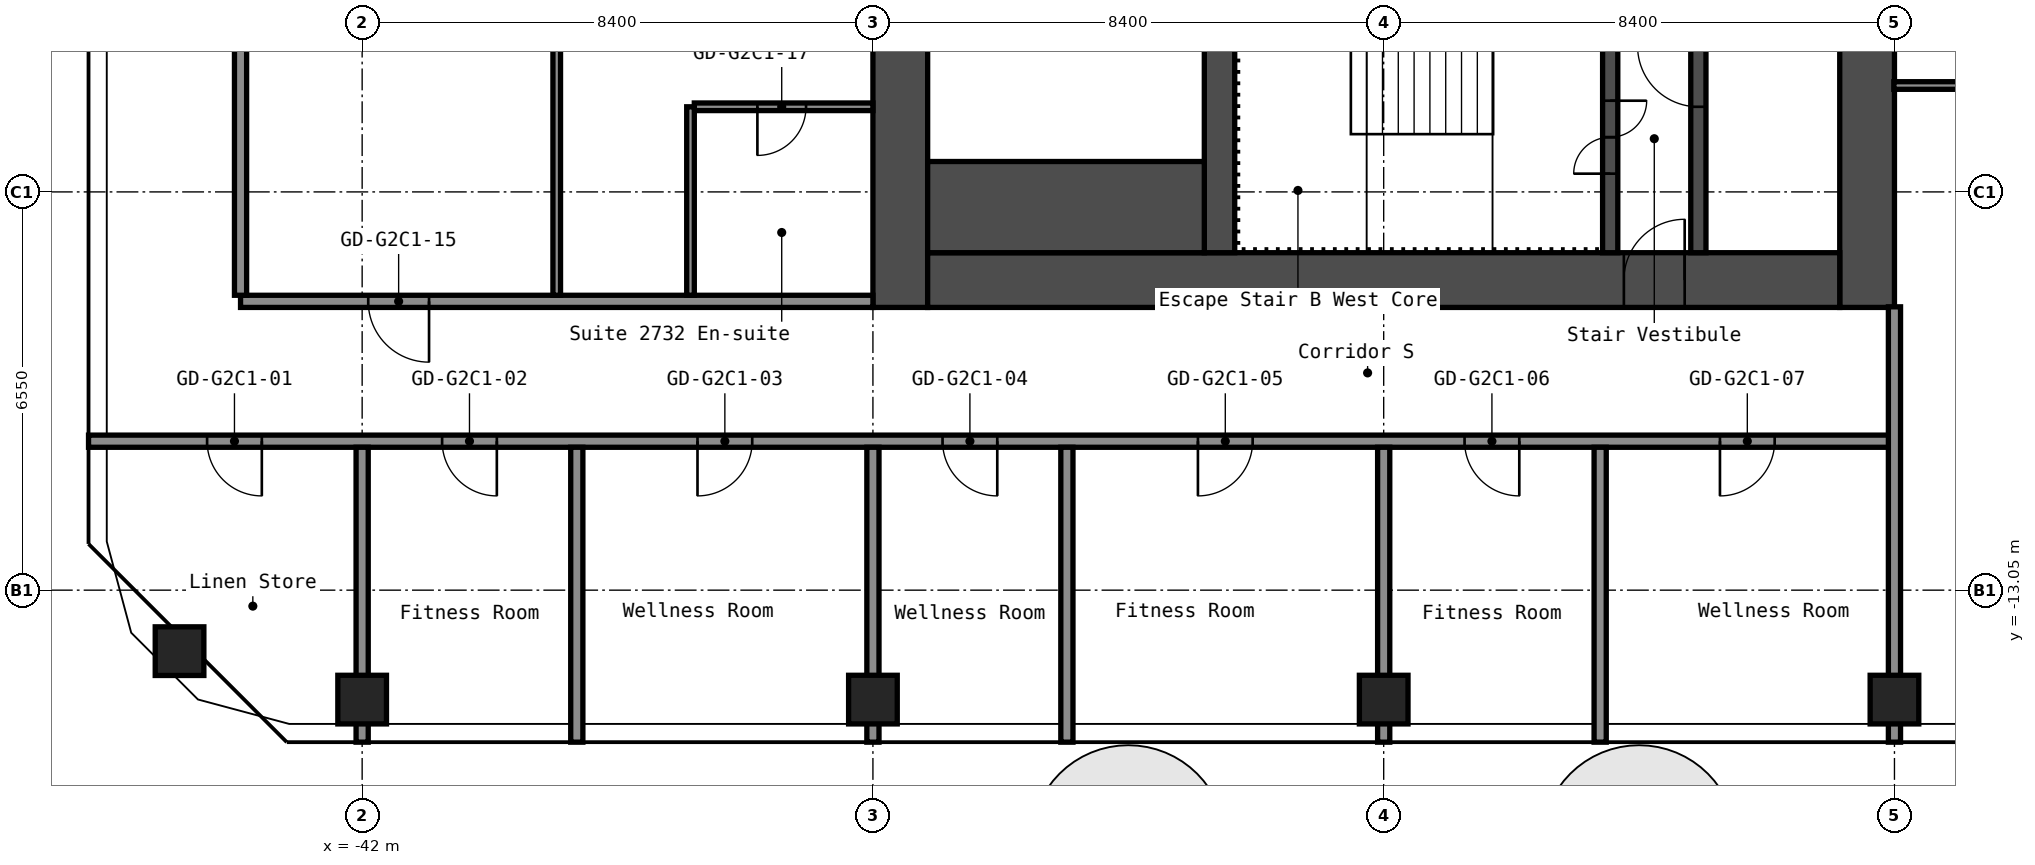
"""IFC4 building model, lengths in metres.
Left out: names, types, materials, properties, quantities, classifications, styles, units other than length and angle.
Written with IfcOpenShell. Run it as: python <this file> out.ifc"""

import sys

from ifc_helpers import new_model, si_unit, direction, frame, frame_2d, origin, origin_2d, place, context, subcontext, project, spatial, rectangle, hollow_rectangle, extrude, element, fill, save


model = new_model("IFC4")
c1 = context("Model", 3, precision=1e-05, world=origin(), true_north=direction((0.0, 1.0)))
c2 = subcontext(c1, "Body", "Model", "MODEL_VIEW")
j1 = project(units=[si_unit("LENGTHUNIT", "METRE"), si_unit("PLANEANGLEUNIT", "RADIAN")], contexts=[c1])
p1 = place(None, origin())
s1 = spatial("IfcSite", under=j1, at=p1, CompositionType="ELEMENT")
p2 = place(p1, origin())
s2 = spatial("IfcBuilding", under=s1, at=p2, CompositionType="ELEMENT")
p3 = place(p2, frame((0.0, 0.0, 97.8)))
s3 = spatial("IfcBuildingStorey", under=s2, at=p3, CompositionType="ELEMENT", Elevation=97.8)
for number, where, z_axis, x_axis in (
    (1, (-45.003, -14.053, 0.0), (0.0, 0.0, 1.0), (1.0, 0.0, 0.0)),
    (2, (-42.0, -14.85, 0.0), (0.0, 0.0, 1.0), (1.0, 0.0, 0.0)),
    (3, (-33.6, -14.85, 0.0), (0.0, 0.0, 1.0), (1.0, 0.0, 0.0)),
    (4, (-25.2, -14.85, 0.0), (0.0, 0.0, 1.0), (1.0, 0.0, 0.0)),
    (5, (-16.8, -14.85, 0.0), (0.0, 0.0, 1.0), (1.0, 0.0, 0.0)),
):
    element("IfcColumn", number, at=place(p3, frame(where, z_axis=z_axis, x_axis=x_axis)), inside=s3, PredefinedType="COLUMN", context=c2, shape_type="SweptSolid", body=[
        extrude(hollow_rectangle(XDim=0.8, YDim=0.8, WallThickness=0.032, at=origin_2d()), origin(), (0.0, 0.0, 1.0), 2.8),
    ])
p4 = place(p3, frame((-17.25, -8.4, 0.0), z_axis=(0.0, 0.0, 1.0), x_axis=(0.0, 1.0, 0.0)))
e6 = element("IfcWall", 6, at=p4, inside=s3, PredefinedType="SHEAR", context=c2, shape_type="SweptSolid", body=[
    extrude(rectangle(XDim=16.8, YDim=0.9, at=frame_2d((8.4, 0.0))), origin(), (0.0, 0.0, 1.0), 2.8),
])
p5 = place(p4, frame((7.6, 0.0, 0.0)))
e7 = element("IfcOpeningElement", 7, at=p5, cuts=e6, PredefinedType="OPENING", context=c2, shape_type="SweptSolid", body=[
    extrude(rectangle(XDim=1.2, YDim=2.1, at=frame_2d((0.6, 1.05))), frame((0.0, 0.46, 0.0), z_axis=(0.0, -1.0, 0.0), x_axis=(1.0, 0.0, 0.0)), (0.0, 0.0, 1.0), 0.92),
])
p6 = place(p3, frame((-33.15, -8.4, 0.0), z_axis=(0.0, 0.0, 1.0), x_axis=(0.0, 1.0, 0.0)))
e8 = element("IfcWall", 8, at=p6, inside=s3, PredefinedType="SHEAR", context=c2, shape_type="SweptSolid", body=[
    extrude(rectangle(XDim=16.8, YDim=0.9, at=frame_2d((8.4, 0.0))), origin(), (0.0, 0.0, 1.0), 2.8),
])
p7 = place(p3, frame((-32.7, -7.95, 0.0), z_axis=(0.0, 0.0, 1.0), x_axis=(1.0, 0.0, 0.0)))
e9 = element("IfcWall", 9, at=p7, inside=s3, PredefinedType="SHEAR", context=c2, shape_type="SweptSolid", body=[
    extrude(rectangle(XDim=15.0, YDim=0.9, at=frame_2d((7.5, 0.0))), origin(), (0.0, 0.0, 1.0), 2.8),
])
p8 = place(p7, frame((11.45, 0.0, 0.0)))
e10 = element("IfcOpeningElement", 10, at=p8, cuts=e9, PredefinedType="OPENING", context=c2, shape_type="SweptSolid", body=[
    extrude(rectangle(XDim=1.0, YDim=2.1, at=frame_2d((0.5, 1.05))), frame((0.0, 0.46, 0.0), z_axis=(0.0, -1.0, 0.0), x_axis=(1.0, 0.0, 0.0)), (0.0, 0.0, 1.0), 0.92),
])
p9 = place(p3, frame((-20.025, -7.5, 0.0), z_axis=(0.0, 0.0, 1.0), x_axis=(0.0, 1.0, 0.0)))
e11 = element("IfcWall", 11, at=p9, inside=s3, PredefinedType="SHEAR", context=c2, shape_type="SweptSolid", body=[
    extrude(rectangle(XDim=6.3, YDim=0.25, at=frame_2d((3.15, 0.0))), origin(), (0.0, 0.0, 1.0), 2.8),
])
p10 = place(p9, frame((2.4, 0.0, 0.0)))
e12 = element("IfcOpeningElement", 12, at=p10, cuts=e11, PredefinedType="OPENING", context=c2, shape_type="SweptSolid", body=[
    extrude(rectangle(XDim=1.0, YDim=2.1, at=frame_2d((0.5, 1.05))), frame((0.0, 0.135, 0.0), z_axis=(0.0, -1.0, 0.0), x_axis=(1.0, 0.0, 0.0)), (0.0, 0.0, 1.0), 0.27),
])
p11 = place(p3, frame((-21.475, -7.5, 0.0), z_axis=(0.0, 0.0, 1.0), x_axis=(0.0, 1.0, 0.0)))
e13 = element("IfcWall", 13, at=p11, inside=s3, PredefinedType="SHEAR", context=c2, shape_type="SweptSolid", body=[
    extrude(rectangle(XDim=3.75, YDim=0.25, at=frame_2d((1.875, 0.0))), origin(), (0.0, 0.0, 1.0), 2.8),
])
p12 = place(p11, frame((1.3, 0.0, 0.0)))
e14 = element("IfcOpeningElement", 14, at=p12, cuts=e13, PredefinedType="OPENING", context=c2, shape_type="SweptSolid", body=[
    extrude(rectangle(XDim=1.2, YDim=2.1, at=frame_2d((0.6, 1.05))), frame((0.0, 0.135, 0.0), z_axis=(0.0, -1.0, 0.0), x_axis=(1.0, 0.0, 0.0)), (0.0, 0.0, 1.0), 0.27),
])
p13 = place(p3, frame((-27.9, -7.5, 0.0), z_axis=(0.0, 0.0, 1.0), x_axis=(0.0, 1.0, 0.0)))
e15 = element("IfcWall", 15, at=p13, inside=s3, PredefinedType="SHEAR", context=c2, shape_type="SweptSolid", body=[
    extrude(rectangle(XDim=3.75, YDim=0.5, at=frame_2d((1.875, 0.0))), origin(), (0.0, 0.0, 1.0), 2.8),
])
p14 = place(p3, frame((-32.7, -6.75, 0.0), z_axis=(0.0, 0.0, 1.0), x_axis=(1.0, 0.0, 0.0)))
e16 = element("IfcWall", 16, at=p14, inside=s3, PredefinedType="SHEAR", context=c2, shape_type="SweptSolid", body=[
    extrude(rectangle(XDim=4.55, YDim=1.5, at=frame_2d((2.275, 0.0))), origin(), (0.0, 0.0, 1.0), 2.8),
])
p15 = place(p3, frame((-46.5, -10.6, 0.0), z_axis=(0.0, 0.0, 1.0), x_axis=(1.0, 0.0, 0.0)))
e17 = element("IfcWall", 17, at=p15, inside=s3, PredefinedType="PARTITIONING", context=c2, shape_type="SweptSolid", body=[
    extrude(rectangle(XDim=29.7, YDim=0.2, at=frame_2d((14.85, 0.0))), origin(), (0.0, 0.0, 1.0), 2.8),
])
p16 = place(p15, frame((1.95, 0.0, 0.0)))
e18 = element("IfcOpeningElement", 18, at=p16, cuts=e17, PredefinedType="OPENING", context=c2, shape_type="SweptSolid", body=[
    extrude(rectangle(XDim=0.9, YDim=2.1, at=frame_2d((0.45, 1.05))), frame((0.0, 0.11, 0.0), z_axis=(0.0, -1.0, 0.0), x_axis=(1.0, 0.0, 0.0)), (0.0, 0.0, 1.0), 0.22),
])
p17 = place(p15, frame((5.815, 0.0, 0.0)))
e19 = element("IfcOpeningElement", 19, at=p17, cuts=e17, PredefinedType="OPENING", context=c2, shape_type="SweptSolid", body=[
    extrude(rectangle(XDim=0.9, YDim=2.1, at=frame_2d((0.45, 1.05))), frame((0.0, 0.11, 0.0), z_axis=(0.0, -1.0, 0.0), x_axis=(1.0, 0.0, 0.0)), (0.0, 0.0, 1.0), 0.22),
])
p18 = place(p15, frame((10.015, 0.0, 0.0)))
e20 = element("IfcOpeningElement", 20, at=p18, cuts=e17, PredefinedType="OPENING", context=c2, shape_type="SweptSolid", body=[
    extrude(rectangle(XDim=0.9, YDim=2.1, at=frame_2d((0.45, 1.05))), frame((0.0, 0.11, 0.0), z_axis=(0.0, -1.0, 0.0), x_axis=(1.0, 0.0, 0.0)), (0.0, 0.0, 1.0), 0.22),
])
p19 = place(p15, frame((14.045, 0.0, 0.0)))
e21 = element("IfcOpeningElement", 21, at=p19, cuts=e17, PredefinedType="OPENING", context=c2, shape_type="SweptSolid", body=[
    extrude(rectangle(XDim=0.9, YDim=2.1, at=frame_2d((0.45, 1.05))), frame((0.0, 0.11, 0.0), z_axis=(0.0, -1.0, 0.0), x_axis=(1.0, 0.0, 0.0)), (0.0, 0.0, 1.0), 0.22),
])
p20 = place(p15, frame((18.245, 0.0, 0.0)))
e22 = element("IfcOpeningElement", 22, at=p20, cuts=e17, PredefinedType="OPENING", context=c2, shape_type="SweptSolid", body=[
    extrude(rectangle(XDim=0.9, YDim=2.1, at=frame_2d((0.45, 1.05))), frame((0.0, 0.11, 0.0), z_axis=(0.0, -1.0, 0.0), x_axis=(1.0, 0.0, 0.0)), (0.0, 0.0, 1.0), 0.22),
])
p21 = place(p15, frame((22.63, 0.0, 0.0)))
e23 = element("IfcOpeningElement", 23, at=p21, cuts=e17, PredefinedType="OPENING", context=c2, shape_type="SweptSolid", body=[
    extrude(rectangle(XDim=0.9, YDim=2.1, at=frame_2d((0.45, 1.05))), frame((0.0, 0.11, 0.0), z_axis=(0.0, -1.0, 0.0), x_axis=(1.0, 0.0, 0.0)), (0.0, 0.0, 1.0), 0.22),
])
p22 = place(p15, frame((26.83, 0.0, 0.0)))
e24 = element("IfcOpeningElement", 24, at=p22, cuts=e17, PredefinedType="OPENING", context=c2, shape_type="SweptSolid", body=[
    extrude(rectangle(XDim=0.9, YDim=2.1, at=frame_2d((0.45, 1.05))), frame((0.0, 0.11, 0.0), z_axis=(0.0, -1.0, 0.0), x_axis=(1.0, 0.0, 0.0)), (0.0, 0.0, 1.0), 0.22),
])
p23 = place(p3, frame((-44.0, -8.3, 0.0), z_axis=(0.0, 0.0, 1.0), x_axis=(1.0, 0.0, 0.0)))
e25 = element("IfcWall", 25, at=p23, inside=s3, PredefinedType="PARTITIONING", context=c2, shape_type="SweptSolid", body=[
    extrude(rectangle(XDim=10.4, YDim=0.2, at=frame_2d((5.2, 0.0))), origin(), (0.0, 0.0, 1.0), 2.8),
])
p24 = place(p23, frame((2.1, 0.0, 0.0)))
e26 = element("IfcOpeningElement", 26, at=p24, cuts=e25, PredefinedType="OPENING", context=c2, shape_type="SweptSolid", body=[
    extrude(rectangle(XDim=1.0, YDim=2.1, at=frame_2d((0.5, 1.05))), frame((0.0, 0.11, 0.0), z_axis=(0.0, -1.0, 0.0), x_axis=(1.0, 0.0, 0.0)), (0.0, 0.0, 1.0), 0.22),
])
p25 = place(p3, frame((-36.538, -5.1, 0.0), z_axis=(0.0, 0.0, 1.0), x_axis=(1.0, 0.0, 0.0)))
e27 = element("IfcWall", 27, at=p25, inside=s3, PredefinedType="PARTITIONING", context=c2, shape_type="SweptSolid", body=[
    extrude(rectangle(XDim=2.938, YDim=0.125, at=frame_2d((1.469, 0.0))), origin(), (0.0, 0.0, 1.0), 2.8),
])
p26 = place(p25, frame((1.038, 0.0, 0.0)))
e28 = element("IfcOpeningElement", 28, at=p26, cuts=e27, PredefinedType="OPENING", context=c2, shape_type="SweptSolid", body=[
    extrude(rectangle(XDim=0.8, YDim=2.1, at=frame_2d((0.4, 1.05))), frame((0.0, 0.073, 0.0), z_axis=(0.0, -1.0, 0.0), x_axis=(1.0, 0.0, 0.0)), (0.0, 0.0, 1.0), 0.145),
])
p27 = place(p3, frame((-16.81, -4.75, 0.0), z_axis=(0.0, 0.0, 1.0), x_axis=(1.0, 0.0, 0.0)))
e29 = element("IfcWall", 29, at=p27, inside=s3, PredefinedType="PARTITIONING", context=c2, shape_type="SweptSolid", body=[
    extrude(rectangle(XDim=3.348, YDim=0.125, at=frame_2d((1.674, 0.0))), origin(), (0.0, 0.0, 1.0), 2.8),
])
p28 = place(p27, frame((1.31, 0.0, 0.0)))
e30 = element("IfcOpeningElement", 30, at=p28, cuts=e29, PredefinedType="OPENING", context=c2, shape_type="SweptSolid", body=[
    extrude(rectangle(XDim=0.8, YDim=2.1, at=frame_2d((0.4, 1.05))), frame((0.0, 0.073, 0.0), z_axis=(0.0, -1.0, 0.0), x_axis=(1.0, 0.0, 0.0)), (0.0, 0.0, 1.0), 0.145),
])
p29 = place(p3, frame((-44.0, -8.2, 0.0), z_axis=(0.0, 0.0, 1.0), x_axis=(0.0, 1.0, 0.0)))
e31 = element("IfcWall", 31, at=p29, inside=s3, PredefinedType="PARTITIONING", context=c2, shape_type="SweptSolid", body=[
    extrude(rectangle(XDim=16.4, YDim=0.2, at=frame_2d((8.2, 0.0))), origin(), (0.0, 0.0, 1.0), 2.8),
])
p30 = place(p3, frame((-42.0, -15.55, 0.0), z_axis=(0.0, 0.0, 1.0), x_axis=(0.0, 1.0, 0.0)))
e32 = element("IfcWall", 32, at=p30, inside=s3, PredefinedType="PARTITIONING", context=c2, shape_type="SweptSolid", body=[
    extrude(rectangle(XDim=4.85, YDim=0.2, at=frame_2d((2.425, 0.0))), origin(), (0.0, 0.0, 1.0), 2.8),
])
p31 = place(p3, frame((-38.8, -8.2, 0.0), z_axis=(0.0, 0.0, 1.0), x_axis=(0.0, 1.0, 0.0)))
e33 = element("IfcWall", 33, at=p31, inside=s3, PredefinedType="PARTITIONING", context=c2, shape_type="SweptSolid", body=[
    extrude(rectangle(XDim=8.1, YDim=0.125, at=frame_2d((4.05, 0.0))), origin(), (0.0, 0.0, 1.0), 2.8),
])
p32 = place(p31, frame((4.05, 0.0, 0.0)))
e34 = element("IfcOpeningElement", 34, at=p32, cuts=e33, PredefinedType="OPENING", context=c2, shape_type="SweptSolid", body=[
    extrude(rectangle(XDim=0.9, YDim=2.1, at=frame_2d((0.45, 1.05))), frame((0.0, 0.073, 0.0), z_axis=(0.0, -1.0, 0.0), x_axis=(1.0, 0.0, 0.0)), (0.0, 0.0, 1.0), 0.145),
])
p33 = place(p3, frame((-38.47, -15.55, 0.0), z_axis=(0.0, 0.0, 1.0), x_axis=(0.0, 1.0, 0.0)))
e35 = element("IfcWall", 35, at=p33, inside=s3, PredefinedType="PARTITIONING", context=c2, shape_type="SweptSolid", body=[
    extrude(rectangle(XDim=4.85, YDim=0.2, at=frame_2d((2.425, 0.0))), origin(), (0.0, 0.0, 1.0), 2.8),
])
p34 = place(p3, frame((-36.6, -8.2, 0.0), z_axis=(0.0, 0.0, 1.0), x_axis=(0.0, 1.0, 0.0)))
e36 = element("IfcWall", 36, at=p34, inside=s3, PredefinedType="PARTITIONING", context=c2, shape_type="SweptSolid", body=[
    extrude(rectangle(XDim=3.1, YDim=0.125, at=frame_2d((1.55, 0.0))), origin(), (0.0, 0.0, 1.0), 2.8),
])
for number, where, z_axis, x_axis in (
    (37, (-33.6, -15.55, 0.0), (0.0, 0.0, 1.0), (0.0, 1.0, 0.0)),
    (38, (-30.41, -15.55, 0.0), (0.0, 0.0, 1.0), (0.0, 1.0, 0.0)),
    (39, (-25.2, -15.55, 0.0), (0.0, 0.0, 1.0), (0.0, 1.0, 0.0)),
    (40, (-21.64, -15.55, 0.0), (0.0, 0.0, 1.0), (0.0, 1.0, 0.0)),
):
    element("IfcWall", number, at=place(p3, frame(where, z_axis=z_axis, x_axis=x_axis)), inside=s3, PredefinedType="PARTITIONING", context=c2, shape_type="SweptSolid", body=[
        extrude(rectangle(XDim=4.85, YDim=0.2, at=frame_2d((2.425, 0.0))), origin(), (0.0, 0.0, 1.0), 2.8),
    ])
p35 = place(p3, frame((-16.8, -15.55, 0.0), z_axis=(0.0, 0.0, 1.0), x_axis=(0.0, 1.0, 0.0)))
e41 = element("IfcWall", 41, at=p35, inside=s3, PredefinedType="PARTITIONING", context=c2, shape_type="SweptSolid", body=[
    extrude(rectangle(XDim=7.16, YDim=0.2, at=frame_2d((3.58, 0.0))), origin(), (0.0, 0.0, 1.0), 2.8),
])
p36 = place(p8, origin())
e42 = element("IfcDoor", 42, at=p36, inside=s3, OperationType="SINGLE_SWING_LEFT", PredefinedType="DOOR", context=c2, shape_type="SweptSolid", body=[
    extrude(rectangle(XDim=1.0, YDim=2.1, at=frame_2d((0.5, 1.05))), frame((0.0, 0.025, 0.0), z_axis=(0.0, -1.0, 0.0), x_axis=(1.0, 0.0, 0.0)), (0.0, 0.0, 1.0), 0.05),
])
fill(e10, e42)
p37 = place(p12, origin())
e43 = element("IfcDoor", 43, at=p37, inside=s3, OperationType="DOUBLE_DOOR_SINGLE_SWING", PredefinedType="DOOR", context=c2, shape_type="SweptSolid", body=[
    extrude(rectangle(XDim=1.2, YDim=2.1, at=frame_2d((0.6, 1.05))), frame((0.0, 0.025, 0.0), z_axis=(0.0, -1.0, 0.0), x_axis=(1.0, 0.0, 0.0)), (0.0, 0.0, 1.0), 0.05),
])
fill(e14, e43)
p38 = place(p10, origin())
e44 = element("IfcDoor", 44, at=p38, inside=s3, OperationType="SINGLE_SWING_LEFT", PredefinedType="DOOR", context=c2, shape_type="SweptSolid", body=[
    extrude(rectangle(XDim=1.0, YDim=2.1, at=frame_2d((0.5, 1.05))), frame((0.0, 0.025, 0.0), z_axis=(0.0, -1.0, 0.0), x_axis=(1.0, 0.0, 0.0)), (0.0, 0.0, 1.0), 0.05),
])
fill(e12, e44)
p39 = place(p16, origin())
e45 = element("IfcDoor", 45, at=p39, inside=s3, OperationType="SINGLE_SWING_RIGHT", PredefinedType="DOOR", context=c2, shape_type="SweptSolid", body=[
    extrude(rectangle(XDim=0.9, YDim=2.1, at=frame_2d((0.45, 1.05))), frame((0.0, 0.025, 0.0), z_axis=(0.0, -1.0, 0.0), x_axis=(1.0, 0.0, 0.0)), (0.0, 0.0, 1.0), 0.05),
])
fill(e18, e45)
p40 = place(p17, origin())
e46 = element("IfcDoor", 46, at=p40, inside=s3, OperationType="SINGLE_SWING_RIGHT", PredefinedType="DOOR", context=c2, shape_type="SweptSolid", body=[
    extrude(rectangle(XDim=0.9, YDim=2.1, at=frame_2d((0.45, 1.05))), frame((0.0, 0.025, 0.0), z_axis=(0.0, -1.0, 0.0), x_axis=(1.0, 0.0, 0.0)), (0.0, 0.0, 1.0), 0.05),
])
fill(e19, e46)
p41 = place(p18, origin())
e47 = element("IfcDoor", 47, at=p41, inside=s3, OperationType="SINGLE_SWING_LEFT", PredefinedType="DOOR", context=c2, shape_type="SweptSolid", body=[
    extrude(rectangle(XDim=0.9, YDim=2.1, at=frame_2d((0.45, 1.05))), frame((0.0, 0.025, 0.0), z_axis=(0.0, -1.0, 0.0), x_axis=(1.0, 0.0, 0.0)), (0.0, 0.0, 1.0), 0.05),
])
fill(e20, e47)
p42 = place(p19, origin())
e48 = element("IfcDoor", 48, at=p42, inside=s3, OperationType="SINGLE_SWING_RIGHT", PredefinedType="DOOR", context=c2, shape_type="SweptSolid", body=[
    extrude(rectangle(XDim=0.9, YDim=2.1, at=frame_2d((0.45, 1.05))), frame((0.0, 0.025, 0.0), z_axis=(0.0, -1.0, 0.0), x_axis=(1.0, 0.0, 0.0)), (0.0, 0.0, 1.0), 0.05),
])
fill(e21, e48)
p43 = place(p20, origin())
e49 = element("IfcDoor", 49, at=p43, inside=s3, OperationType="SINGLE_SWING_LEFT", PredefinedType="DOOR", context=c2, shape_type="SweptSolid", body=[
    extrude(rectangle(XDim=0.9, YDim=2.1, at=frame_2d((0.45, 1.05))), frame((0.0, 0.025, 0.0), z_axis=(0.0, -1.0, 0.0), x_axis=(1.0, 0.0, 0.0)), (0.0, 0.0, 1.0), 0.05),
])
fill(e22, e49)
p44 = place(p21, origin())
e50 = element("IfcDoor", 50, at=p44, inside=s3, OperationType="SINGLE_SWING_RIGHT", PredefinedType="DOOR", context=c2, shape_type="SweptSolid", body=[
    extrude(rectangle(XDim=0.9, YDim=2.1, at=frame_2d((0.45, 1.05))), frame((0.0, 0.025, 0.0), z_axis=(0.0, -1.0, 0.0), x_axis=(1.0, 0.0, 0.0)), (0.0, 0.0, 1.0), 0.05),
])
fill(e23, e50)
p45 = place(p22, origin())
e51 = element("IfcDoor", 51, at=p45, inside=s3, OperationType="SINGLE_SWING_LEFT", PredefinedType="DOOR", context=c2, shape_type="SweptSolid", body=[
    extrude(rectangle(XDim=0.9, YDim=2.1, at=frame_2d((0.45, 1.05))), frame((0.0, 0.025, 0.0), z_axis=(0.0, -1.0, 0.0), x_axis=(1.0, 0.0, 0.0)), (0.0, 0.0, 1.0), 0.05),
])
fill(e24, e51)
p46 = place(p24, origin())
e52 = element("IfcDoor", 52, at=p46, inside=s3, OperationType="SINGLE_SWING_RIGHT", PredefinedType="DOOR", context=c2, shape_type="SweptSolid", body=[
    extrude(rectangle(XDim=1.0, YDim=2.1, at=frame_2d((0.5, 1.05))), frame((0.0, 0.025, 0.0), z_axis=(0.0, -1.0, 0.0), x_axis=(1.0, 0.0, 0.0)), (0.0, 0.0, 1.0), 0.05),
])
fill(e26, e52)
p47 = place(p26, origin())
e53 = element("IfcDoor", 53, at=p47, inside=s3, OperationType="SINGLE_SWING_LEFT", PredefinedType="DOOR", context=c2, shape_type="SweptSolid", body=[
    extrude(rectangle(XDim=0.8, YDim=2.1, at=frame_2d((0.4, 1.05))), frame((0.0, 0.025, 0.0), z_axis=(0.0, -1.0, 0.0), x_axis=(1.0, 0.0, 0.0)), (0.0, 0.0, 1.0), 0.05),
])
fill(e28, e53)
save(model, sys.argv[1])
